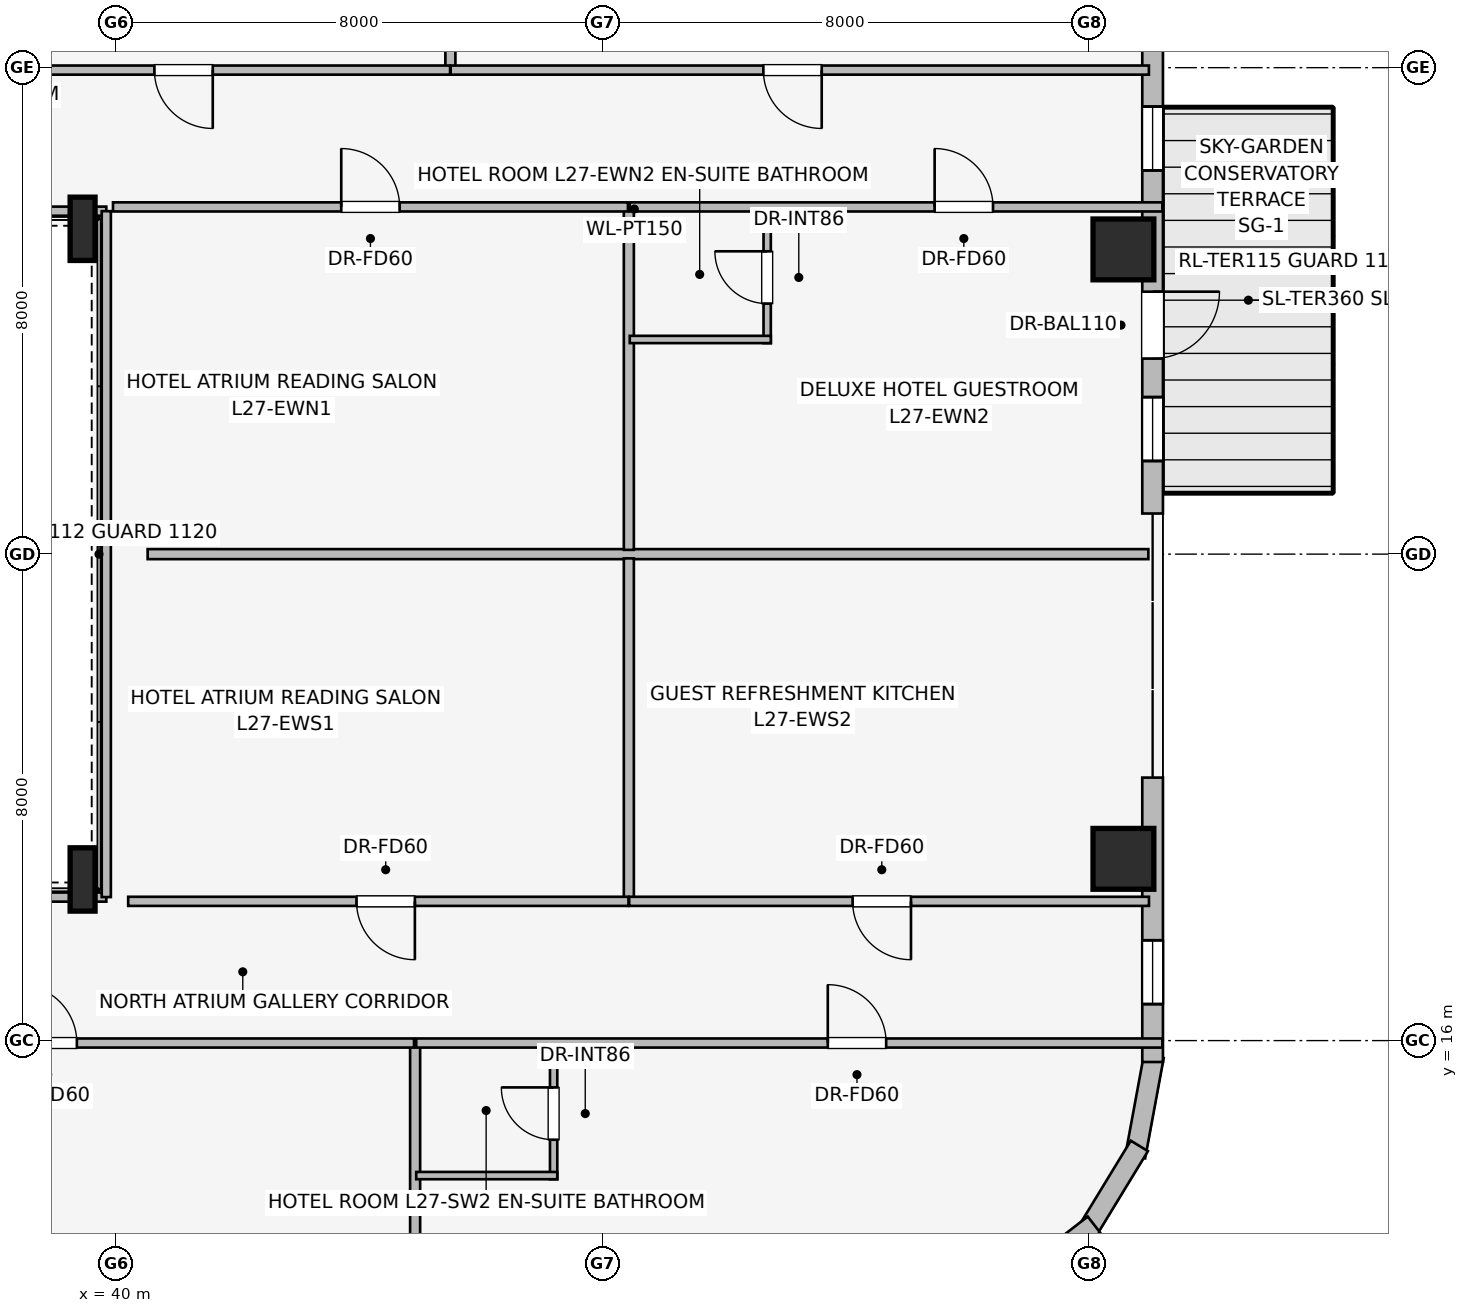
"""IFC4 building model, lengths in metres.
Left out: names, types, materials, properties, quantities, classifications, styles, units other than length and angle.
Written with IfcOpenShell. Run it as: python <this file> out.ifc"""

import sys

from ifc_helpers import new_model, si_unit, direction, frame, frame_2d, origin, origin_2d, place, context, subcontext, project, spatial, rectangle, i_section, extrude, element, fill, save


model = new_model("IFC4")
c1 = context("Model", 3, precision=1e-05, world=origin(), true_north=direction((0.0, 1.0)))
c2 = subcontext(c1, "Body", "Model", "MODEL_VIEW")
j1 = project(units=[si_unit("LENGTHUNIT", "METRE"), si_unit("PLANEANGLEUNIT", "RADIAN")], contexts=[c1])
p1 = place(None, origin())
s1 = spatial("IfcSite", under=j1, at=p1, CompositionType="ELEMENT")
p2 = place(p1, origin())
s2 = spatial("IfcBuilding", under=s1, at=p2, CompositionType="ELEMENT")
p3 = place(p2, frame((0.0, 0.0, 105.0)))
s3 = spatial("IfcBuildingStorey", under=s2, at=p3, CompositionType="ELEMENT", Elevation=105.0)
for number, where, z_axis, x_axis in (
    (1, (56.568, 18.989, 0.0), (0.0, 0.0, 1.0), (1.0, 0.0, 0.0)),
    (2, (56.568, 29.011, 0.0), (0.0, 0.0, 1.0), (1.0, 0.0, 0.0)),
):
    element("IfcColumn", number, at=place(p3, frame(where, z_axis=z_axis, x_axis=x_axis)), inside=s3, PredefinedType="COLUMN", context=c2, shape_type="SweptSolid", body=[
        extrude(rectangle(XDim=1.0, YDim=1.0, at=origin_2d()), origin(), (0.0, 0.0, 1.0), 3.45),
    ])
for number, where, z_axis, x_axis in (
    (3, (39.45, 18.65, 0.0), (0.0, 0.0, 1.0), (1.0, 0.0, 0.0)),
    (4, (39.45, 29.35, 0.0), (0.0, 0.0, 1.0), (1.0, 0.0, 0.0)),
):
    element("IfcColumn", number, at=place(p3, frame(where, z_axis=z_axis, x_axis=x_axis)), inside=s3, PredefinedType="COLUMN", context=c2, shape_type="SweptSolid", body=[
        extrude(i_section(OverallWidth=0.41, OverallDepth=1.041, WebThickness=0.031, FlangeThickness=0.056, at=origin_2d()), origin(), (0.0, 0.0, 1.0), 3.45),
    ])
for number, where, z_axis, x_axis in (
    (5, (56.763, 33.907, 0.0), (0.0, 0.0, 1.0), (0.182, -0.983, 0.0)),
    (6, (57.068, 15.742, 0.0), (0.0, 0.0, 1.0), (-0.182, -0.983, 0.0)),
):
    element("IfcWall", number, at=place(p3, frame(where, z_axis=z_axis, x_axis=x_axis)), inside=s3, PredefinedType="STANDARD", context=c2, shape_type="SweptSolid", body=[
        extrude(rectangle(XDim=1.677, YDim=0.33, at=frame_2d((0.838, 0.0))), origin(), (0.0, 0.0, 1.0), 3.19),
    ])
p4 = place(p3, frame((56.83, 14.268, 0.0), z_axis=(0.0, 0.0, 1.0), x_axis=(-0.520519429557, -0.853849824883, 0.0)))
e7 = element("IfcWall", 7, at=p4, inside=s3, PredefinedType="STANDARD", context=c2, shape_type="SweptSolid", body=[
    extrude(rectangle(XDim=1.677, YDim=0.33, at=frame_2d((0.839, 0.0))), origin(), (0.0, 0.0, 1.0), 3.19),
])
p5 = place(p3, frame((56.082, 12.976, 0.0), z_axis=(0.0, 0.0, 1.0), x_axis=(-0.790621329885, -0.612305408053, 0.0)))
e8 = element("IfcWall", 8, at=p5, inside=s3, PredefinedType="STANDARD", context=c2, shape_type="SweptSolid", body=[
    extrude(rectangle(XDim=1.676, YDim=0.33, at=frame_2d((0.838, 0.0))), origin(), (0.0, 0.0, 1.0), 3.19),
])
p6 = place(p3, frame((57.048, 32.352, 0.0), z_axis=(0.0, 0.0, 1.0), x_axis=(0.0, -1.0, 0.0)))
e9 = element("IfcWall", 9, at=p6, inside=s3, PredefinedType="STANDARD", context=c2, shape_type="SweptSolid", body=[
    extrude(rectangle(XDim=7.684, YDim=0.34, at=frame_2d((3.842, 0.0))), origin(), (0.0, 0.0, 1.0), 3.19),
])
p7 = place(p6, frame((4.036, 0.0, 0.0)))
e10 = element("IfcOpeningElement", 10, at=p7, cuts=e9, PredefinedType="OPENING", context=c2, shape_type="SweptSolid", body=[
    extrude(rectangle(XDim=1.1, YDim=2.04, at=frame_2d((0.55, 1.02))), frame((0.0, 0.18, 0.0), z_axis=(0.0, -1.0, 0.0), x_axis=(1.0, 0.0, 0.0)), (0.0, 0.0, 1.0), 0.36),
])
p8 = place(p6, frame((0.992, 0.0, 0.75)))
e11 = element("IfcOpeningElement", 11, at=p8, cuts=e9, PredefinedType="OPENING", context=c2, shape_type="SweptSolid", body=[
    extrude(rectangle(XDim=1.05, YDim=1.4, at=frame_2d((0.525, 0.7))), frame((0.0, 0.18, 0.0), z_axis=(0.0, -1.0, 0.0), x_axis=(1.0, 0.0, 0.0)), (0.0, 0.0, 1.0), 0.36),
])
p9 = place(p6, frame((5.77, 0.0, 0.75)))
e12 = element("IfcOpeningElement", 12, at=p9, cuts=e9, PredefinedType="OPENING", context=c2, shape_type="SweptSolid", body=[
    extrude(rectangle(XDim=1.05, YDim=1.4, at=frame_2d((0.525, 0.7))), frame((0.0, 0.18, 0.0), z_axis=(0.0, -1.0, 0.0), x_axis=(1.0, 0.0, 0.0)), (0.0, 0.0, 1.0), 0.36),
])
p10 = place(p3, frame((57.048, 20.325, 0.0), z_axis=(0.0, 0.0, 1.0), x_axis=(0.0, -1.0, 0.0)))
e13 = element("IfcWall", 13, at=p10, inside=s3, PredefinedType="STANDARD", context=c2, shape_type="SweptSolid", body=[
    extrude(rectangle(XDim=4.677, YDim=0.34, at=frame_2d((2.338, 0.0))), origin(), (0.0, 0.0, 1.0), 3.19),
])
p11 = place(p10, frame((2.675, 0.0, 0.75)))
e14 = element("IfcOpeningElement", 14, at=p11, cuts=e13, PredefinedType="OPENING", context=c2, shape_type="SweptSolid", body=[
    extrude(rectangle(XDim=1.05, YDim=1.4, at=frame_2d((0.525, 0.7))), frame((0.0, 0.18, 0.0), z_axis=(0.0, -1.0, 0.0), x_axis=(1.0, 0.0, 0.0)), (0.0, 0.0, 1.0), 0.36),
])
p12 = place(p3, frame((27.675, 18.36, 0.0), z_axis=(0.0, 0.0, 1.0), x_axis=(1.0, 0.0, 0.0)))
e15 = element("IfcWall", 15, at=p12, inside=s3, PredefinedType="PARTITIONING", context=c2, shape_type="SweptSolid", body=[
    extrude(rectangle(XDim=12.165, YDim=0.15, at=frame_2d((6.083, 0.0))), origin(), (0.0, 0.0, 1.0), 2.331),
])
p13 = place(p3, frame((39.84, 29.64, 0.0), z_axis=(0.0, 0.0, 1.0), x_axis=(-1.0, 0.0, 0.0)))
e16 = element("IfcWall", 16, at=p13, inside=s3, PredefinedType="PARTITIONING", context=c2, shape_type="SweptSolid", body=[
    extrude(rectangle(XDim=12.2, YDim=0.15, at=frame_2d((6.1, 0.0))), origin(), (0.0, 0.0, 1.0), 2.331),
])
p14 = place(p3, frame((39.84, 18.36, 0.0), z_axis=(0.0, 0.0, 1.0), x_axis=(0.0, 1.0, 0.0)))
e17 = element("IfcWall", 17, at=p14, inside=s3, PredefinedType="PARTITIONING", context=c2, shape_type="SweptSolid", body=[
    extrude(rectangle(XDim=11.28, YDim=0.15, at=frame_2d((5.64, 0.0))), origin(), (0.0, 0.0, 1.0), 3.19),
])
p15 = place(p3, frame((45.499, 31.97, 0.0), z_axis=(0.0, 0.0, 1.0), x_axis=(0.0, 1.0, 0.0)))
e18 = element("IfcWall", 18, at=p15, inside=s3, PredefinedType="PARTITIONING", context=c2, shape_type="SweptSolid", body=[
    extrude(rectangle(XDim=8.702, YDim=0.165, at=frame_2d((4.351, 0.0))), origin(), (0.0, 0.0, 1.0), 3.19),
])
p16 = place(p3, frame((45.494, 31.96, 0.0), z_axis=(0.0, 0.0, 1.0), x_axis=(-1.0, 0.0, 0.0)))
e19 = element("IfcWall", 19, at=p16, inside=s3, PredefinedType="PARTITIONING", context=c2, shape_type="SweptSolid", body=[
    extrude(rectangle(XDim=11.204, YDim=0.15, at=frame_2d((5.602, 0.0))), origin(), (0.0, 0.0, 1.0), 3.19),
])
p17 = place(p16, frame((3.903, 0.0, 0.0)))
e20 = element("IfcOpeningElement", 20, at=p17, cuts=e19, PredefinedType="OPENING", context=c2, shape_type="SweptSolid", body=[
    extrude(rectangle(XDim=0.96, YDim=2.0, at=frame_2d((0.48, 1.0))), frame((0.0, 0.085, 0.0), z_axis=(0.0, -1.0, 0.0), x_axis=(1.0, 0.0, 0.0)), (0.0, 0.0, 1.0), 0.17),
])
p18 = place(p3, frame((56.987, 31.96, 0.0), z_axis=(0.0, 0.0, 1.0), x_axis=(-1.0, 0.0, 0.0)))
e21 = element("IfcWall", 21, at=p18, inside=s3, PredefinedType="PARTITIONING", context=c2, shape_type="SweptSolid", body=[
    extrude(rectangle(XDim=11.483, YDim=0.15, at=frame_2d((5.742, 0.0))), origin(), (0.0, 0.0, 1.0), 3.19),
])
p19 = place(p18, frame((5.381, 0.0, 0.0)))
e22 = element("IfcOpeningElement", 22, at=p19, cuts=e21, PredefinedType="OPENING", context=c2, shape_type="SweptSolid", body=[
    extrude(rectangle(XDim=0.96, YDim=2.0, at=frame_2d((0.48, 1.0))), frame((0.0, 0.085, 0.0), z_axis=(0.0, -1.0, 0.0), x_axis=(1.0, 0.0, 0.0)), (0.0, 0.0, 1.0), 0.17),
])
p20 = place(p3, frame((40.52, 24.0, 0.0), z_axis=(0.0, 0.0, 1.0), x_axis=(1.0, 0.0, 0.0)))
e23 = element("IfcWall", 23, at=p20, inside=s3, PredefinedType="PARTITIONING", context=c2, shape_type="SweptSolid", body=[
    extrude(rectangle(XDim=16.458, YDim=0.165, at=frame_2d((8.229, 0.0))), origin(), (0.0, 0.0, 1.0), 3.19),
])
p21 = place(p3, frame((48.434, 24.07, 0.0), z_axis=(0.0, 0.0, 1.0), x_axis=(0.0, 1.0, 0.0)))
e24 = element("IfcWall", 24, at=p21, inside=s3, PredefinedType="PARTITIONING", context=c2, shape_type="SweptSolid", body=[
    extrude(rectangle(XDim=5.64, YDim=0.165, at=frame_2d((2.82, 0.0))), origin(), (0.0, 0.0, 1.0), 3.19),
])
p22 = place(p3, frame((39.95, 29.71, 0.0), z_axis=(0.0, 0.0, 1.0), x_axis=(1.0, 0.0, 0.0)))
e25 = element("IfcWall", 25, at=p22, inside=s3, PredefinedType="PARTITIONING", context=c2, shape_type="SweptSolid", body=[
    extrude(rectangle(XDim=8.469, YDim=0.15, at=frame_2d((4.234, 0.0))), origin(), (0.0, 0.0, 1.0), 3.19),
])
p23 = place(p22, frame((3.754, 0.0, 0.0)))
e26 = element("IfcOpeningElement", 26, at=p23, cuts=e25, PredefinedType="OPENING", context=c2, shape_type="SweptSolid", body=[
    extrude(rectangle(XDim=0.96, YDim=2.0, at=frame_2d((0.48, 1.0))), frame((0.0, 0.085, 0.0), z_axis=(0.0, -1.0, 0.0), x_axis=(1.0, 0.0, 0.0)), (0.0, 0.0, 1.0), 0.17),
])
p24 = place(p3, frame((50.709, 27.47, 0.0), z_axis=(0.0, 0.0, 1.0), x_axis=(0.0, 1.0, 0.0)))
e27 = element("IfcWall", 27, at=p24, inside=s3, PredefinedType="PARTITIONING", context=c2, shape_type="SweptSolid", body=[
    extrude(rectangle(XDim=2.24, YDim=0.12, at=frame_2d((1.12, 0.0))), origin(), (0.0, 0.0, 1.0), 3.19),
])
p25 = place(p24, frame((0.65, 0.0, 0.0)))
e28 = element("IfcOpeningElement", 28, at=p25, cuts=e27, PredefinedType="OPENING", context=c2, shape_type="SweptSolid", body=[
    extrude(rectangle(XDim=0.86, YDim=2.0, at=frame_2d((0.43, 1.0))), frame((0.0, 0.07, 0.0), z_axis=(0.0, -1.0, 0.0), x_axis=(1.0, 0.0, 0.0)), (0.0, 0.0, 1.0), 0.14),
])
p26 = place(p3, frame((48.449, 27.53, 0.0), z_axis=(0.0, 0.0, 1.0), x_axis=(1.0, 0.0, 0.0)))
e29 = element("IfcWall", 29, at=p26, inside=s3, PredefinedType="PARTITIONING", context=c2, shape_type="SweptSolid", body=[
    extrude(rectangle(XDim=2.32, YDim=0.12, at=frame_2d((1.16, 0.0))), origin(), (0.0, 0.0, 1.0), 3.19),
])
p27 = place(p3, frame((48.449, 29.71, 0.0), z_axis=(0.0, 0.0, 1.0), x_axis=(1.0, 0.0, 0.0)))
e30 = element("IfcWall", 30, at=p27, inside=s3, PredefinedType="PARTITIONING", context=c2, shape_type="SweptSolid", body=[
    extrude(rectangle(XDim=8.759, YDim=0.15, at=frame_2d((4.379, 0.0))), origin(), (0.0, 0.0, 1.0), 3.19),
])
p28 = place(p27, frame((5.014, 0.0, 0.0)))
e31 = element("IfcOpeningElement", 31, at=p28, cuts=e30, PredefinedType="OPENING", context=c2, shape_type="SweptSolid", body=[
    extrude(rectangle(XDim=0.96, YDim=2.0, at=frame_2d((0.48, 1.0))), frame((0.0, 0.085, 0.0), z_axis=(0.0, -1.0, 0.0), x_axis=(1.0, 0.0, 0.0)), (0.0, 0.0, 1.0), 0.17),
])
p29 = place(p3, frame((48.434, 18.29, 0.0), z_axis=(0.0, 0.0, 1.0), x_axis=(0.0, 1.0, 0.0)))
e32 = element("IfcWall", 32, at=p29, inside=s3, PredefinedType="PARTITIONING", context=c2, shape_type="SweptSolid", body=[
    extrude(rectangle(XDim=5.64, YDim=0.165, at=frame_2d((2.82, 0.0))), origin(), (0.0, 0.0, 1.0), 3.19),
])
p30 = place(p3, frame((48.429, 18.29, 0.0), z_axis=(0.0, 0.0, 1.0), x_axis=(-1.0, 0.0, 0.0)))
e33 = element("IfcWall", 33, at=p30, inside=s3, PredefinedType="PARTITIONING", context=c2, shape_type="SweptSolid", body=[
    extrude(rectangle(XDim=8.229, YDim=0.15, at=frame_2d((4.115, 0.0))), origin(), (0.0, 0.0, 1.0), 3.19),
])
p31 = place(p30, frame((3.514, 0.0, 0.0)))
e34 = element("IfcOpeningElement", 34, at=p31, cuts=e33, PredefinedType="OPENING", context=c2, shape_type="SweptSolid", body=[
    extrude(rectangle(XDim=0.96, YDim=2.0, at=frame_2d((0.48, 1.0))), frame((0.0, 0.085, 0.0), z_axis=(0.0, -1.0, 0.0), x_axis=(1.0, 0.0, 0.0)), (0.0, 0.0, 1.0), 0.17),
])
p32 = place(p3, frame((56.988, 18.29, 0.0), z_axis=(0.0, 0.0, 1.0), x_axis=(-1.0, 0.0, 0.0)))
e35 = element("IfcWall", 35, at=p32, inside=s3, PredefinedType="PARTITIONING", context=c2, shape_type="SweptSolid", body=[
    extrude(rectangle(XDim=8.549, YDim=0.15, at=frame_2d((4.274, 0.0))), origin(), (0.0, 0.0, 1.0), 3.19),
])
p33 = place(p32, frame((3.914, 0.0, 0.0)))
e36 = element("IfcOpeningElement", 36, at=p33, cuts=e35, PredefinedType="OPENING", context=c2, shape_type="SweptSolid", body=[
    extrude(rectangle(XDim=0.96, YDim=2.0, at=frame_2d((0.48, 1.0))), frame((0.0, 0.085, 0.0), z_axis=(0.0, -1.0, 0.0), x_axis=(1.0, 0.0, 0.0)), (0.0, 0.0, 1.0), 0.17),
])
p34 = place(p3, frame((44.919, 7.029, 0.0), z_axis=(0.0, 0.0, 1.0), x_axis=(0.0, 1.0, 0.0)))
e37 = element("IfcWall", 37, at=p34, inside=s3, PredefinedType="PARTITIONING", context=c2, shape_type="SweptSolid", body=[
    extrude(rectangle(XDim=8.901, YDim=0.165, at=frame_2d((4.45, 0.0))), origin(), (0.0, 0.0, 1.0), 3.19),
])
p35 = place(p3, frame((32.85, 15.96, 0.0), z_axis=(0.0, 0.0, 1.0), x_axis=(1.0, 0.0, 0.0)))
e38 = element("IfcWall", 38, at=p35, inside=s3, PredefinedType="PARTITIONING", context=c2, shape_type="SweptSolid", body=[
    extrude(rectangle(XDim=12.051, YDim=0.15, at=frame_2d((6.025, 0.0))), origin(), (0.0, 0.0, 1.0), 3.19),
])
p36 = place(p35, frame((5.546, 0.0, 0.0)))
e39 = element("IfcOpeningElement", 39, at=p36, cuts=e38, PredefinedType="OPENING", context=c2, shape_type="SweptSolid", body=[
    extrude(rectangle(XDim=0.96, YDim=2.0, at=frame_2d((0.48, 1.0))), frame((0.0, 0.085, 0.0), z_axis=(0.0, -1.0, 0.0), x_axis=(1.0, 0.0, 0.0)), (0.0, 0.0, 1.0), 0.17),
])
p37 = place(p3, frame((47.197, 13.72, 0.0), z_axis=(0.0, 0.0, 1.0), x_axis=(0.0, 1.0, 0.0)))
e40 = element("IfcWall", 40, at=p37, inside=s3, PredefinedType="PARTITIONING", context=c2, shape_type="SweptSolid", body=[
    extrude(rectangle(XDim=2.24, YDim=0.12, at=frame_2d((1.12, 0.0))), origin(), (0.0, 0.0, 1.0), 3.19),
])
p38 = place(p37, frame((0.65, 0.0, 0.0)))
e41 = element("IfcOpeningElement", 41, at=p38, cuts=e40, PredefinedType="OPENING", context=c2, shape_type="SweptSolid", body=[
    extrude(rectangle(XDim=0.86, YDim=2.0, at=frame_2d((0.43, 1.0))), frame((0.0, 0.07, 0.0), z_axis=(0.0, -1.0, 0.0), x_axis=(1.0, 0.0, 0.0)), (0.0, 0.0, 1.0), 0.14),
])
p39 = place(p3, frame((44.937, 13.78, 0.0), z_axis=(0.0, 0.0, 1.0), x_axis=(1.0, 0.0, 0.0)))
e42 = element("IfcWall", 42, at=p39, inside=s3, PredefinedType="PARTITIONING", context=c2, shape_type="SweptSolid", body=[
    extrude(rectangle(XDim=2.32, YDim=0.12, at=frame_2d((1.16, 0.0))), origin(), (0.0, 0.0, 1.0), 3.19),
])
p40 = place(p3, frame((44.937, 15.96, 0.0), z_axis=(0.0, 0.0, 1.0), x_axis=(1.0, 0.0, 0.0)))
e43 = element("IfcWall", 43, at=p40, inside=s3, PredefinedType="PARTITIONING", context=c2, shape_type="SweptSolid", body=[
    extrude(rectangle(XDim=12.271, YDim=0.15, at=frame_2d((6.135, 0.0))), origin(), (0.0, 0.0, 1.0), 3.19),
])
p41 = place(p40, frame((6.769, 0.0, 0.0)))
e44 = element("IfcOpeningElement", 44, at=p41, cuts=e43, PredefinedType="OPENING", context=c2, shape_type="SweptSolid", body=[
    extrude(rectangle(XDim=0.96, YDim=2.0, at=frame_2d((0.48, 1.0))), frame((0.0, 0.085, 0.0), z_axis=(0.0, -1.0, 0.0), x_axis=(1.0, 0.0, 0.0)), (0.0, 0.0, 1.0), 0.17),
])
p42 = place(p7, origin())
e45 = element("IfcDoor", 45, at=p42, inside=s3, OperationType="SINGLE_SWING_LEFT", PredefinedType="DOOR", context=c2, shape_type="SweptSolid", body=[
    extrude(rectangle(XDim=1.1, YDim=2.04, at=frame_2d((0.55, 1.02))), frame((0.0, 0.025, 0.0), z_axis=(0.0, -1.0, 0.0), x_axis=(1.0, 0.0, 0.0)), (0.0, 0.0, 1.0), 0.05),
])
fill(e10, e45)
p43 = place(p8, origin())
e46 = element("IfcWindow", 46, at=p43, inside=s3, PartitioningType="SINGLE_PANEL", PredefinedType="WINDOW", context=c2, shape_type="SweptSolid", body=[
    extrude(rectangle(XDim=1.05, YDim=1.4, at=frame_2d((0.525, 0.7))), frame((0.0, 0.03, 0.0), z_axis=(0.0, -1.0, 0.0), x_axis=(1.0, 0.0, 0.0)), (0.0, 0.0, 1.0), 0.06),
])
fill(e11, e46)
p44 = place(p9, origin())
e47 = element("IfcWindow", 47, at=p44, inside=s3, PartitioningType="SINGLE_PANEL", PredefinedType="WINDOW", context=c2, shape_type="SweptSolid", body=[
    extrude(rectangle(XDim=1.05, YDim=1.4, at=frame_2d((0.525, 0.7))), frame((0.0, 0.03, 0.0), z_axis=(0.0, -1.0, 0.0), x_axis=(1.0, 0.0, 0.0)), (0.0, 0.0, 1.0), 0.06),
])
fill(e12, e47)
p45 = place(p11, origin())
e48 = element("IfcWindow", 48, at=p45, inside=s3, PartitioningType="SINGLE_PANEL", PredefinedType="WINDOW", context=c2, shape_type="SweptSolid", body=[
    extrude(rectangle(XDim=1.05, YDim=1.4, at=frame_2d((0.525, 0.7))), frame((0.0, 0.03, 0.0), z_axis=(0.0, -1.0, 0.0), x_axis=(1.0, 0.0, 0.0)), (0.0, 0.0, 1.0), 0.06),
])
fill(e14, e48)
p46 = place(p17, origin())
e49 = element("IfcDoor", 49, at=p46, inside=s3, OperationType="SINGLE_SWING_LEFT", PredefinedType="DOOR", context=c2, shape_type="SweptSolid", body=[
    extrude(rectangle(XDim=0.96, YDim=2.0, at=frame_2d((0.48, 1.0))), frame((0.0, 0.025, 0.0), z_axis=(0.0, -1.0, 0.0), x_axis=(1.0, 0.0, 0.0)), (0.0, 0.0, 1.0), 0.05),
])
fill(e20, e49)
p47 = place(p19, origin())
e50 = element("IfcDoor", 50, at=p47, inside=s3, OperationType="SINGLE_SWING_LEFT", PredefinedType="DOOR", context=c2, shape_type="SweptSolid", body=[
    extrude(rectangle(XDim=0.96, YDim=2.0, at=frame_2d((0.48, 1.0))), frame((0.0, 0.025, 0.0), z_axis=(0.0, -1.0, 0.0), x_axis=(1.0, 0.0, 0.0)), (0.0, 0.0, 1.0), 0.05),
])
fill(e22, e50)
p48 = place(p23, origin())
e51 = element("IfcDoor", 51, at=p48, inside=s3, OperationType="SINGLE_SWING_LEFT", PredefinedType="DOOR", context=c2, shape_type="SweptSolid", body=[
    extrude(rectangle(XDim=0.96, YDim=2.0, at=frame_2d((0.48, 1.0))), frame((0.0, 0.025, 0.0), z_axis=(0.0, -1.0, 0.0), x_axis=(1.0, 0.0, 0.0)), (0.0, 0.0, 1.0), 0.05),
])
fill(e26, e51)
p49 = place(p25, origin())
e52 = element("IfcDoor", 52, at=p49, inside=s3, OperationType="SINGLE_SWING_RIGHT", PredefinedType="DOOR", context=c2, shape_type="SweptSolid", body=[
    extrude(rectangle(XDim=0.86, YDim=2.0, at=frame_2d((0.43, 1.0))), frame((0.0, 0.025, 0.0), z_axis=(0.0, -1.0, 0.0), x_axis=(1.0, 0.0, 0.0)), (0.0, 0.0, 1.0), 0.05),
])
fill(e28, e52)
p50 = place(p28, origin())
e53 = element("IfcDoor", 53, at=p50, inside=s3, OperationType="SINGLE_SWING_LEFT", PredefinedType="DOOR", context=c2, shape_type="SweptSolid", body=[
    extrude(rectangle(XDim=0.96, YDim=2.0, at=frame_2d((0.48, 1.0))), frame((0.0, 0.025, 0.0), z_axis=(0.0, -1.0, 0.0), x_axis=(1.0, 0.0, 0.0)), (0.0, 0.0, 1.0), 0.05),
])
fill(e31, e53)
p51 = place(p31, origin())
e54 = element("IfcDoor", 54, at=p51, inside=s3, OperationType="SINGLE_SWING_LEFT", PredefinedType="DOOR", context=c2, shape_type="SweptSolid", body=[
    extrude(rectangle(XDim=0.96, YDim=2.0, at=frame_2d((0.48, 1.0))), frame((0.0, 0.025, 0.0), z_axis=(0.0, -1.0, 0.0), x_axis=(1.0, 0.0, 0.0)), (0.0, 0.0, 1.0), 0.05),
])
fill(e34, e54)
p52 = place(p33, origin())
e55 = element("IfcDoor", 55, at=p52, inside=s3, OperationType="SINGLE_SWING_LEFT", PredefinedType="DOOR", context=c2, shape_type="SweptSolid", body=[
    extrude(rectangle(XDim=0.96, YDim=2.0, at=frame_2d((0.48, 1.0))), frame((0.0, 0.025, 0.0), z_axis=(0.0, -1.0, 0.0), x_axis=(1.0, 0.0, 0.0)), (0.0, 0.0, 1.0), 0.05),
])
fill(e36, e55)
p53 = place(p36, origin())
e56 = element("IfcDoor", 56, at=p53, inside=s3, OperationType="SINGLE_SWING_LEFT", PredefinedType="DOOR", context=c2, shape_type="SweptSolid", body=[
    extrude(rectangle(XDim=0.96, YDim=2.0, at=frame_2d((0.48, 1.0))), frame((0.0, 0.025, 0.0), z_axis=(0.0, -1.0, 0.0), x_axis=(1.0, 0.0, 0.0)), (0.0, 0.0, 1.0), 0.05),
])
fill(e39, e56)
p54 = place(p38, origin())
e57 = element("IfcDoor", 57, at=p54, inside=s3, OperationType="SINGLE_SWING_RIGHT", PredefinedType="DOOR", context=c2, shape_type="SweptSolid", body=[
    extrude(rectangle(XDim=0.86, YDim=2.0, at=frame_2d((0.43, 1.0))), frame((0.0, 0.025, 0.0), z_axis=(0.0, -1.0, 0.0), x_axis=(1.0, 0.0, 0.0)), (0.0, 0.0, 1.0), 0.05),
])
fill(e41, e57)
p55 = place(p41, origin())
e58 = element("IfcDoor", 58, at=p55, inside=s3, OperationType="SINGLE_SWING_LEFT", PredefinedType="DOOR", context=c2, shape_type="SweptSolid", body=[
    extrude(rectangle(XDim=0.96, YDim=2.0, at=frame_2d((0.48, 1.0))), frame((0.0, 0.025, 0.0), z_axis=(0.0, -1.0, 0.0), x_axis=(1.0, 0.0, 0.0)), (0.0, 0.0, 1.0), 0.05),
])
fill(e44, e58)
save(model, sys.argv[1])
